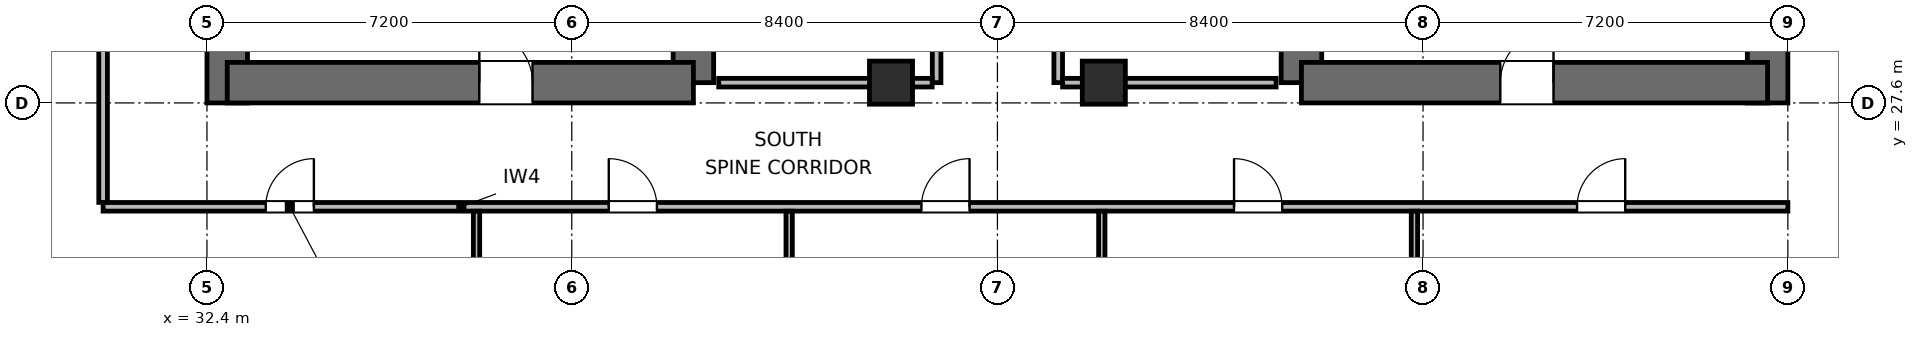
"""IFC4 building model, lengths in metres.
Left out: names, types, materials, properties, quantities, classifications, styles, units other than length and angle.
Written with IfcOpenShell. Run it as: python <this file> out.ifc"""

import sys

from ifc_helpers import new_model, si_unit, direction, frame, frame_2d, origin, origin_2d, place, context, subcontext, project, spatial, rectangle, extrude, element, fill, save


model = new_model("IFC4")
c1 = context("Model", 3, precision=1e-05, world=origin(), true_north=direction((0.0, 1.0)))
c2 = subcontext(c1, "Body", "Model", "MODEL_VIEW")
j1 = project(units=[si_unit("LENGTHUNIT", "METRE"), si_unit("PLANEANGLEUNIT", "RADIAN")], contexts=[c1])
p1 = place(None, origin())
s1 = spatial("IfcSite", under=j1, at=p1, CompositionType="ELEMENT")
p2 = place(p1, origin())
s2 = spatial("IfcBuilding", under=s1, at=p2, CompositionType="ELEMENT")
p3 = place(p2, frame((0.0, 0.0, 133.8)))
s3 = spatial("IfcBuildingStorey", under=s2, at=p3, CompositionType="ELEMENT", Elevation=133.8)
p4 = place(p3, frame((32.8, 27.6, 0.0), z_axis=(0.0, 0.0, 1.0), x_axis=(0.0, 1.0, 0.0)))
e1 = element("IfcWall", 1, at=p4, inside=s3, PredefinedType="SHEAR", context=c2, shape_type="SweptSolid", body=[
    extrude(rectangle(XDim=16.8, YDim=0.8, at=frame_2d((8.4, 0.0))), origin(), (0.0, 0.0, 1.0), 3.9),
])
p5 = place(p3, frame((42.0, 28.0, 0.0), z_axis=(0.0, 0.0, 1.0), x_axis=(0.0, 1.0, 0.0)))
e2 = element("IfcWall", 2, at=p5, inside=s3, PredefinedType="SHEAR", context=c2, shape_type="SweptSolid", body=[
    extrude(rectangle(XDim=6.4, YDim=0.8, at=frame_2d((3.2, 0.0))), origin(), (0.0, 0.0, 1.0), 3.9),
])
p6 = place(p3, frame((32.8, 28.0, 0.0), z_axis=(0.0, 0.0, 1.0), x_axis=(1.0, 0.0, 0.0)))
e3 = element("IfcWall", 3, at=p6, inside=s3, PredefinedType="SHEAR", context=c2, shape_type="SweptSolid", body=[
    extrude(rectangle(XDim=9.2, YDim=0.8, at=frame_2d((4.6, 0.0))), origin(), (0.0, 0.0, 1.0), 3.9),
])
p7 = place(p6, frame((4.975, 0.0, 0.0)))
e4 = element("IfcOpeningElement", 4, at=p7, cuts=e3, PredefinedType="OPENING", context=c2, shape_type="SweptSolid", body=[
    extrude(rectangle(XDim=1.05, YDim=2.04, at=frame_2d((0.525, 1.02))), frame((0.0, 0.41, 0.0), z_axis=(0.0, -1.0, 0.0), x_axis=(1.0, 0.0, 0.0)), (0.0, 0.0, 1.0), 0.82),
])
p8 = place(p3, frame((54.0, 28.0, 0.0), z_axis=(0.0, 0.0, 1.0), x_axis=(0.0, 1.0, 0.0)))
e5 = element("IfcWall", 5, at=p8, inside=s3, PredefinedType="SHEAR", context=c2, shape_type="SweptSolid", body=[
    extrude(rectangle(XDim=7.8, YDim=0.8, at=frame_2d((3.9, 0.0))), origin(), (0.0, 0.0, 1.0), 3.9),
])
p9 = place(p3, frame((63.2, 27.6, 0.0), z_axis=(0.0, 0.0, 1.0), x_axis=(0.0, 1.0, 0.0)))
e6 = element("IfcWall", 6, at=p9, inside=s3, PredefinedType="SHEAR", context=c2, shape_type="SweptSolid", body=[
    extrude(rectangle(XDim=16.8, YDim=0.8, at=frame_2d((8.4, 0.0))), origin(), (0.0, 0.0, 1.0), 3.9),
])
p10 = place(p3, frame((54.0, 28.0, 0.0), z_axis=(0.0, 0.0, 1.0), x_axis=(1.0, 0.0, 0.0)))
e7 = element("IfcWall", 7, at=p10, inside=s3, PredefinedType="SHEAR", context=c2, shape_type="SweptSolid", body=[
    extrude(rectangle(XDim=9.2, YDim=0.8, at=frame_2d((4.6, 0.0))), origin(), (0.0, 0.0, 1.0), 3.9),
])
p11 = place(p10, frame((3.925, 0.0, 0.0)))
e8 = element("IfcOpeningElement", 8, at=p11, cuts=e7, PredefinedType="OPENING", context=c2, shape_type="SweptSolid", body=[
    extrude(rectangle(XDim=1.05, YDim=2.04, at=frame_2d((0.525, 1.02))), frame((0.0, 0.41, 0.0), z_axis=(0.0, -1.0, 0.0), x_axis=(1.0, 0.0, 0.0)), (0.0, 0.0, 1.0), 0.82),
])
for number, where, z_axis, x_axis in (
    (9, (45.9, 28.0, 0.0), (0.0, 0.0, 1.0), (1.0, 0.0, 0.0)),
    (10, (50.1, 28.0, 0.0), (0.0, 0.0, 1.0), (1.0, 0.0, 0.0)),
):
    element("IfcColumn", number, at=place(p3, frame(where, z_axis=z_axis, x_axis=x_axis)), inside=s3, PredefinedType="COLUMN", context=c2, shape_type="SweptSolid", body=[
        extrude(rectangle(XDim=0.85, YDim=0.85, at=origin_2d()), origin(), (0.0, 0.0, 1.0), 3.9),
    ])
p12 = place(p3, frame((46.8, 28.0, 0.0), z_axis=(0.0, 0.0, 1.0), x_axis=(0.0, 1.0, 0.0)))
e11 = element("IfcWall", 11, at=p12, inside=s3, PredefinedType="PARTITIONING", context=c2, shape_type="SweptSolid", body=[
    extrude(rectangle(XDim=4.5, YDim=0.17, at=frame_2d((2.25, 0.0))), origin(), (0.0, 0.0, 1.0), 3.64),
])
p13 = place(p12, frame((0.675, 0.0, 0.0)))
e12 = element("IfcOpeningElement", 12, at=p13, cuts=e11, PredefinedType="OPENING", context=c2, shape_type="SweptSolid", body=[
    extrude(rectangle(XDim=0.9, YDim=2.02, at=frame_2d((0.45, 1.01))), frame((0.0, 0.095, 0.0), z_axis=(0.0, -1.0, 0.0), x_axis=(1.0, 0.0, 0.0)), (0.0, 0.0, 1.0), 0.19),
])
p14 = place(p12, frame((2.925, 0.0, 0.0)))
e13 = element("IfcOpeningElement", 13, at=p14, cuts=e11, PredefinedType="OPENING", context=c2, shape_type="SweptSolid", body=[
    extrude(rectangle(XDim=0.9, YDim=2.02, at=frame_2d((0.45, 1.01))), frame((0.0, 0.095, 0.0), z_axis=(0.0, -1.0, 0.0), x_axis=(1.0, 0.0, 0.0)), (0.0, 0.0, 1.0), 0.19),
])
p15 = place(p3, frame((42.5, 28.0, 0.0), z_axis=(0.0, 0.0, 1.0), x_axis=(1.0, 0.0, 0.0)))
e14 = element("IfcWall", 14, at=p15, inside=s3, PredefinedType="PARTITIONING", context=c2, shape_type="SweptSolid", body=[
    extrude(rectangle(XDim=4.213, YDim=0.17, at=frame_2d((2.106, 0.0))), origin(), (0.0, 0.0, 1.0), 2.525),
])
p16 = place(p3, frame((49.2, 28.0, 0.0), z_axis=(0.0, 0.0, 1.0), x_axis=(0.0, 1.0, 0.0)))
e15 = element("IfcWall", 15, at=p16, inside=s3, PredefinedType="PARTITIONING", context=c2, shape_type="SweptSolid", body=[
    extrude(rectangle(XDim=4.5, YDim=0.17, at=frame_2d((2.25, 0.0))), origin(), (0.0, 0.0, 1.0), 3.64),
])
p17 = place(p16, frame((1.8, 0.0, 0.0)))
e16 = element("IfcOpeningElement", 16, at=p17, cuts=e15, PredefinedType="OPENING", context=c2, shape_type="SweptSolid", body=[
    extrude(rectangle(XDim=0.9, YDim=2.02, at=frame_2d((0.45, 1.01))), frame((0.0, 0.095, 0.0), z_axis=(0.0, -1.0, 0.0), x_axis=(1.0, 0.0, 0.0)), (0.0, 0.0, 1.0), 0.19),
])
p18 = place(p3, frame((49.287, 28.0, 0.0), z_axis=(0.0, 0.0, 1.0), x_axis=(1.0, 0.0, 0.0)))
e17 = element("IfcWall", 17, at=p18, inside=s3, PredefinedType="PARTITIONING", context=c2, shape_type="SweptSolid", body=[
    extrude(rectangle(XDim=4.213, YDim=0.17, at=frame_2d((2.106, 0.0))), origin(), (0.0, 0.0, 1.0), 2.525),
])
p19 = place(p3, frame((30.35, 25.55, 0.0), z_axis=(0.0, 0.0, 1.0), x_axis=(1.0, 0.0, 0.0)))
e18 = element("IfcWall", 18, at=p19, inside=s3, PredefinedType="PARTITIONING", context=c2, shape_type="SweptSolid", body=[
    extrude(rectangle(XDim=33.25, YDim=0.17, at=frame_2d((16.625, 0.0))), origin(), (0.0, 0.0, 1.0), 3.64),
])
p20 = place(p19, frame((3.21, 0.0, 0.0)))
e19 = element("IfcOpeningElement", 19, at=p20, cuts=e18, PredefinedType="OPENING", context=c2, shape_type="SweptSolid", body=[
    extrude(rectangle(XDim=0.95, YDim=2.04, at=frame_2d((0.475, 1.02))), frame((0.0, 0.095, 0.0), z_axis=(0.0, -1.0, 0.0), x_axis=(1.0, 0.0, 0.0)), (0.0, 0.0, 1.0), 0.19),
])
p21 = place(p19, frame((9.98, 0.0, 0.0)))
e20 = element("IfcOpeningElement", 20, at=p21, cuts=e18, PredefinedType="OPENING", context=c2, shape_type="SweptSolid", body=[
    extrude(rectangle(XDim=0.95, YDim=2.04, at=frame_2d((0.475, 1.02))), frame((0.0, 0.095, 0.0), z_axis=(0.0, -1.0, 0.0), x_axis=(1.0, 0.0, 0.0)), (0.0, 0.0, 1.0), 0.19),
])
p22 = place(p19, frame((16.15, 0.0, 0.0)))
e21 = element("IfcOpeningElement", 21, at=p22, cuts=e18, PredefinedType="OPENING", context=c2, shape_type="SweptSolid", body=[
    extrude(rectangle(XDim=0.95, YDim=2.04, at=frame_2d((0.475, 1.02))), frame((0.0, 0.095, 0.0), z_axis=(0.0, -1.0, 0.0), x_axis=(1.0, 0.0, 0.0)), (0.0, 0.0, 1.0), 0.19),
])
p23 = place(p19, frame((22.32, 0.0, 0.0)))
e22 = element("IfcOpeningElement", 22, at=p23, cuts=e18, PredefinedType="OPENING", context=c2, shape_type="SweptSolid", body=[
    extrude(rectangle(XDim=0.95, YDim=2.04, at=frame_2d((0.475, 1.02))), frame((0.0, 0.095, 0.0), z_axis=(0.0, -1.0, 0.0), x_axis=(1.0, 0.0, 0.0)), (0.0, 0.0, 1.0), 0.19),
])
p24 = place(p19, frame((29.09, 0.0, 0.0)))
e23 = element("IfcOpeningElement", 23, at=p24, cuts=e18, PredefinedType="OPENING", context=c2, shape_type="SweptSolid", body=[
    extrude(rectangle(XDim=0.95, YDim=2.04, at=frame_2d((0.475, 1.02))), frame((0.0, 0.095, 0.0), z_axis=(0.0, -1.0, 0.0), x_axis=(1.0, 0.0, 0.0)), (0.0, 0.0, 1.0), 0.19),
])
p25 = place(p3, frame((30.35, 25.637, 0.0), z_axis=(0.0, 0.0, 1.0), x_axis=(0.0, 1.0, 0.0)))
e24 = element("IfcWall", 24, at=p25, inside=s3, PredefinedType="PARTITIONING", context=c2, shape_type="SweptSolid", body=[
    extrude(rectangle(XDim=8.763, YDim=0.17, at=frame_2d((4.381, 0.0))), origin(), (0.0, 0.0, 1.0), 3.64),
])
p26 = place(p25, frame((3.863, 0.0, 0.0)))
e25 = element("IfcOpeningElement", 25, at=p26, cuts=e24, PredefinedType="OPENING", context=c2, shape_type="SweptSolid", body=[
    extrude(rectangle(XDim=0.95, YDim=2.04, at=frame_2d((0.475, 1.02))), frame((0.0, 0.095, 0.0), z_axis=(0.0, -1.0, 0.0), x_axis=(1.0, 0.0, 0.0)), (0.0, 0.0, 1.0), 0.19),
])
p27 = place(p3, frame((37.72, 9.915, 0.0), z_axis=(0.0, 0.0, 1.0), x_axis=(0.0, 1.0, 0.0)))
e26 = element("IfcWall", 26, at=p27, inside=s3, PredefinedType="PARTITIONING", context=c2, shape_type="SweptSolid", body=[
    extrude(rectangle(XDim=15.548, YDim=0.125, at=frame_2d((7.774, 0.0))), origin(), (0.0, 0.0, 1.0), 3.64),
])
p28 = place(p3, frame((43.89, 13.575, 0.0), z_axis=(0.0, 0.0, 1.0), x_axis=(0.0, 1.0, 0.0)))
e27 = element("IfcWall", 27, at=p28, inside=s3, PredefinedType="PARTITIONING", context=c2, shape_type="SweptSolid", body=[
    extrude(rectangle(XDim=11.888, YDim=0.125, at=frame_2d((5.944, 0.0))), origin(), (0.0, 0.0, 1.0), 3.003),
])
p29 = place(p3, frame((50.06, 11.515, 0.0), z_axis=(0.0, 0.0, 1.0), x_axis=(0.0, 1.0, 0.0)))
e28 = element("IfcWall", 28, at=p29, inside=s3, PredefinedType="PARTITIONING", context=c2, shape_type="SweptSolid", body=[
    extrude(rectangle(XDim=13.948, YDim=0.125, at=frame_2d((6.974, 0.0))), origin(), (0.0, 0.0, 1.0), 3.64),
])
p30 = place(p3, frame((56.23, 9.915, 0.0), z_axis=(0.0, 0.0, 1.0), x_axis=(0.0, 1.0, 0.0)))
e29 = element("IfcWall", 29, at=p30, inside=s3, PredefinedType="PARTITIONING", context=c2, shape_type="SweptSolid", body=[
    extrude(rectangle(XDim=15.548, YDim=0.125, at=frame_2d((7.774, 0.0))), origin(), (0.0, 0.0, 1.0), 3.003),
])
p31 = place(p7, origin())
e30 = element("IfcDoor", 30, at=p31, inside=s3, OperationType="SINGLE_SWING_LEFT", PredefinedType="DOOR", context=c2, shape_type="SweptSolid", body=[
    extrude(rectangle(XDim=1.05, YDim=2.04, at=frame_2d((0.525, 1.02))), frame((0.0, 0.025, 0.0), z_axis=(0.0, -1.0, 0.0), x_axis=(1.0, 0.0, 0.0)), (0.0, 0.0, 1.0), 0.05),
])
fill(e4, e30)
p32 = place(p11, origin())
e31 = element("IfcDoor", 31, at=p32, inside=s3, OperationType="SINGLE_SWING_RIGHT", PredefinedType="DOOR", context=c2, shape_type="SweptSolid", body=[
    extrude(rectangle(XDim=1.05, YDim=2.04, at=frame_2d((0.525, 1.02))), frame((0.0, 0.025, 0.0), z_axis=(0.0, -1.0, 0.0), x_axis=(1.0, 0.0, 0.0)), (0.0, 0.0, 1.0), 0.05),
])
fill(e8, e31)
p33 = place(p20, origin())
e32 = element("IfcDoor", 32, at=p33, inside=s3, OperationType="SINGLE_SWING_RIGHT", PredefinedType="DOOR", context=c2, shape_type="SweptSolid", body=[
    extrude(rectangle(XDim=0.95, YDim=2.04, at=frame_2d((0.475, 1.02))), frame((0.0, 0.025, 0.0), z_axis=(0.0, -1.0, 0.0), x_axis=(1.0, 0.0, 0.0)), (0.0, 0.0, 1.0), 0.05),
])
fill(e19, e32)
p34 = place(p21, origin())
e33 = element("IfcDoor", 33, at=p34, inside=s3, OperationType="SINGLE_SWING_LEFT", PredefinedType="DOOR", context=c2, shape_type="SweptSolid", body=[
    extrude(rectangle(XDim=0.95, YDim=2.04, at=frame_2d((0.475, 1.02))), frame((0.0, 0.025, 0.0), z_axis=(0.0, -1.0, 0.0), x_axis=(1.0, 0.0, 0.0)), (0.0, 0.0, 1.0), 0.05),
])
fill(e20, e33)
p35 = place(p22, origin())
e34 = element("IfcDoor", 34, at=p35, inside=s3, OperationType="SINGLE_SWING_RIGHT", PredefinedType="DOOR", context=c2, shape_type="SweptSolid", body=[
    extrude(rectangle(XDim=0.95, YDim=2.04, at=frame_2d((0.475, 1.02))), frame((0.0, 0.025, 0.0), z_axis=(0.0, -1.0, 0.0), x_axis=(1.0, 0.0, 0.0)), (0.0, 0.0, 1.0), 0.05),
])
fill(e21, e34)
p36 = place(p23, origin())
e35 = element("IfcDoor", 35, at=p36, inside=s3, OperationType="SINGLE_SWING_LEFT", PredefinedType="DOOR", context=c2, shape_type="SweptSolid", body=[
    extrude(rectangle(XDim=0.95, YDim=2.04, at=frame_2d((0.475, 1.02))), frame((0.0, 0.025, 0.0), z_axis=(0.0, -1.0, 0.0), x_axis=(1.0, 0.0, 0.0)), (0.0, 0.0, 1.0), 0.05),
])
fill(e22, e35)
p37 = place(p24, origin())
e36 = element("IfcDoor", 36, at=p37, inside=s3, OperationType="SINGLE_SWING_RIGHT", PredefinedType="DOOR", context=c2, shape_type="SweptSolid", body=[
    extrude(rectangle(XDim=0.95, YDim=2.04, at=frame_2d((0.475, 1.02))), frame((0.0, 0.025, 0.0), z_axis=(0.0, -1.0, 0.0), x_axis=(1.0, 0.0, 0.0)), (0.0, 0.0, 1.0), 0.05),
])
fill(e23, e36)
save(model, sys.argv[1])
